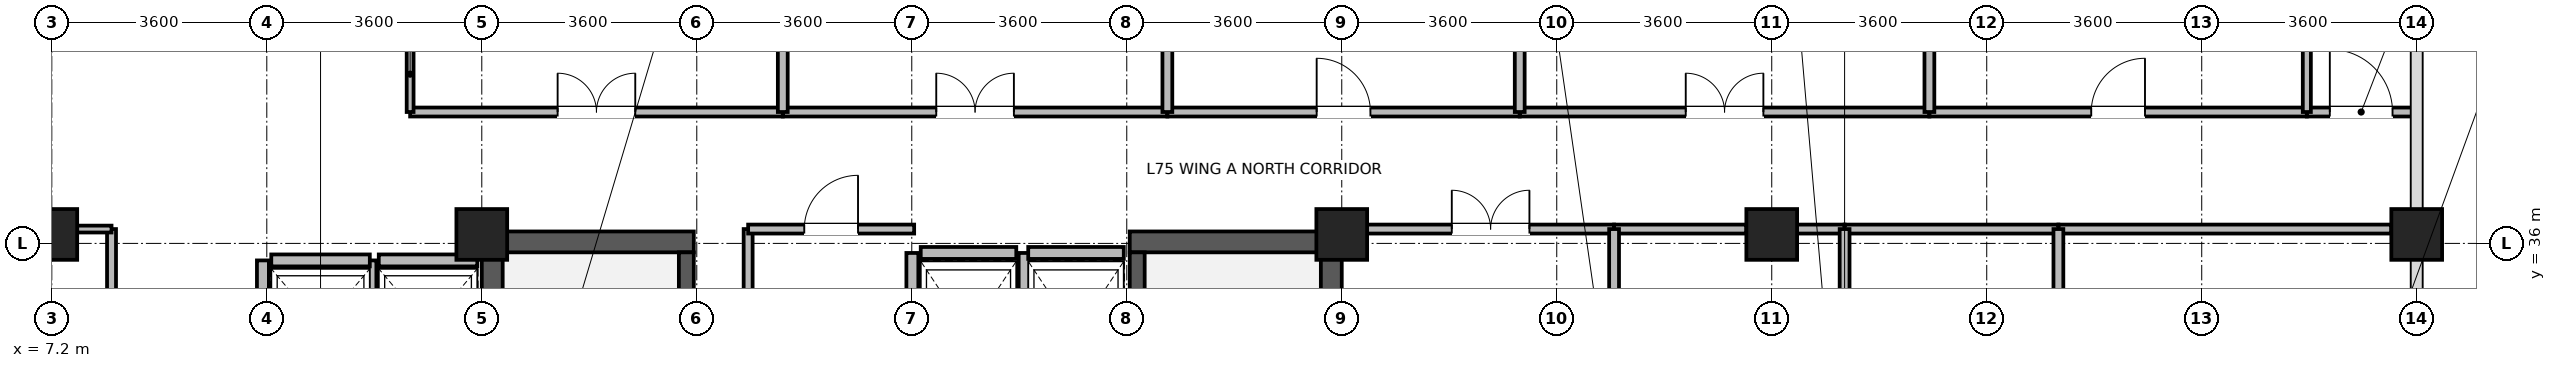
"""IFC4 building model, lengths in metres.
Left out: names, types, materials, properties, quantities, classifications, styles, units other than length and angle.
Written with IfcOpenShell. Run it as: python <this file> out.ifc"""

import sys

from ifc_helpers import new_model, si_unit, direction, frame, frame_2d, origin, origin_2d, place, context, subcontext, project, spatial, rectangle, extrude, source, transform, mapped, element, fill, save


model = new_model("IFC4")
c1 = context("Model", 3, precision=1e-05, world=origin(), true_north=direction((0.0, 1.0)))
c2 = subcontext(c1, "Body", "Model", "MODEL_VIEW")
j1 = project(units=[si_unit("LENGTHUNIT", "METRE"), si_unit("PLANEANGLEUNIT", "RADIAN")], contexts=[c1])
p1 = place(None, origin())
s1 = spatial("IfcSite", under=j1, at=p1, CompositionType="ELEMENT")
p2 = place(p1, origin())
s2 = spatial("IfcBuilding", under=s1, at=p2, CompositionType="ELEMENT")
p3 = place(p2, frame((0.0, 0.0, 290.6)))
s3 = spatial("IfcBuildingStorey", under=s2, at=p3, CompositionType="ELEMENT", Elevation=290.6)
for number, where, z_axis, x_axis in (
    (1, (14.575, 28.5, 0.0), (0.0, 0.0, 1.0), (0.0, 1.0, 0.0)),
    (2, (28.625, 28.5, 0.0), (0.0, 0.0, 1.0), (0.0, 1.0, 0.0)),
):
    element("IfcWall", number, at=place(p3, frame(where, z_axis=z_axis, x_axis=x_axis)), inside=s3, PredefinedType="SHEAR", context=c2, shape_type="SweptSolid", body=[
        extrude(rectangle(XDim=7.7, YDim=0.35, at=frame_2d((3.85, 0.0))), origin(), (0.0, 0.0, 1.0), 3.475),
    ])
for number, where, z_axis, x_axis in (
    (3, (14.75, 36.025, 0.0), (0.0, 0.0, 1.0), (1.0, 0.0, 0.0)),
    (4, (25.25, 36.025, 0.0), (0.0, 0.0, 1.0), (1.0, 0.0, 0.0)),
):
    element("IfcWall", number, at=place(p3, frame(where, z_axis=z_axis, x_axis=x_axis)), inside=s3, PredefinedType="SHEAR", context=c2, shape_type="SweptSolid", body=[
        extrude(rectangle(XDim=3.2, YDim=0.35, at=frame_2d((1.6, 0.0))), origin(), (0.0, 0.0, 1.0), 3.475),
    ])
p4 = place(p3, frame((17.825, 28.85, 0.0), z_axis=(0.0, 0.0, 1.0), x_axis=(0.0, 1.0, 0.0)))
e5 = element("IfcWall", 5, at=p4, inside=s3, PredefinedType="SHEAR", context=c2, shape_type="SweptSolid", body=[
    extrude(rectangle(XDim=7.0, YDim=0.25, at=frame_2d((3.5, 0.0))), origin(), (0.0, 0.0, 1.0), 3.475),
])
p5 = place(p4, frame((0.15, 0.0, 0.0)))
e6 = element("IfcOpeningElement", 6, at=p5, cuts=e5, PredefinedType="OPENING", context=c2, shape_type="SweptSolid", body=[
    extrude(rectangle(XDim=1.1, YDim=2.08, at=frame_2d((0.55, 1.04))), frame((0.0, 0.135, 0.0), z_axis=(0.0, -1.0, 0.0), x_axis=(1.0, 0.0, 0.0)), (0.0, 0.0, 1.0), 0.27),
])
p6 = place(p3, frame((25.375, 28.85, 0.0), z_axis=(0.0, 0.0, 1.0), x_axis=(0.0, 1.0, 0.0)))
e7 = element("IfcWall", 7, at=p6, inside=s3, PredefinedType="SHEAR", context=c2, shape_type="SweptSolid", body=[
    extrude(rectangle(XDim=7.0, YDim=0.25, at=frame_2d((3.5, 0.0))), origin(), (0.0, 0.0, 1.0), 3.475),
])
p7 = place(p6, frame((0.15, 0.0, 0.0)))
e8 = element("IfcOpeningElement", 8, at=p7, cuts=e7, PredefinedType="OPENING", context=c2, shape_type="SweptSolid", body=[
    extrude(rectangle(XDim=1.1, YDim=2.08, at=frame_2d((0.55, 1.04))), frame((0.0, 0.135, 0.0), z_axis=(0.0, -1.0, 0.0), x_axis=(1.0, 0.0, 0.0)), (0.0, 0.0, 1.0), 0.27),
])
m1 = source(origin(), c2, "Body", "SweptSolid", [
    extrude(rectangle(XDim=0.85, YDim=0.85, at=origin_2d()), origin(), (0.0, 0.0, 1.0), 3.7),
])
for number, where, z_axis, x_axis in (
    (9, (7.2, 36.15, 0.0), (0.0, 0.0, 1.0), (1.0, 0.0, 0.0)),
    (10, (14.4, 36.15, 0.0), (0.0, 0.0, 1.0), (1.0, 0.0, 0.0)),
    (11, (28.8, 36.15, 0.0), (0.0, 0.0, 1.0), (1.0, 0.0, 0.0)),
    (12, (36.0, 36.15, 0.0), (0.0, 0.0, 1.0), (1.0, 0.0, 0.0)),
    (13, (46.8, 36.15, 0.0), (0.0, 0.0, 1.0), (1.0, 0.0, 0.0)),
):
    element("IfcColumn", number, at=place(p3, frame(where, z_axis=z_axis, x_axis=x_axis)), inside=s3, PredefinedType="COLUMN", context=c2, shape_type="MappedRepresentation", body=[
        mapped(m1, transform((0.0, 0.0, 0.0), x_axis=(1.0, 0.0, 0.0), y_axis=(0.0, 1.0, 0.0), z_axis=(0.0, 0.0, 1.0), scale=1.0)),
    ])
p8 = place(p3, frame((12.675, 35.715, 0.0), z_axis=(0.0, 0.0, 1.0), x_axis=(1.0, 0.0, 0.0)))
e14 = element("IfcWall", 14, at=p8, inside=s3, PredefinedType="PARTITIONING", context=c2, shape_type="SweptSolid", body=[
    extrude(rectangle(XDim=1.65, YDim=0.2, at=frame_2d((0.825, 0.0))), origin(), (0.0, 0.0, 1.0), 3.455),
])
p9 = place(p3, frame((12.535, 33.485, 0.0), z_axis=(0.0, 0.0, 1.0), x_axis=(0.0, 1.0, 0.0)))
e15 = element("IfcWall", 15, at=p9, inside=s3, PredefinedType="PARTITIONING", context=c2, shape_type="SweptSolid", body=[
    extrude(rectangle(XDim=2.23, YDim=0.2, at=frame_2d((1.115, 0.0))), origin(), (0.0, 0.0, 1.0), 3.455),
])
p10 = place(p3, frame((10.875, 35.715, 0.0), z_axis=(0.0, 0.0, 1.0), x_axis=(1.0, 0.0, 0.0)))
e16 = element("IfcWall", 16, at=p10, inside=s3, PredefinedType="PARTITIONING", context=c2, shape_type="SweptSolid", body=[
    extrude(rectangle(XDim=1.65, YDim=0.2, at=frame_2d((0.825, 0.0))), origin(), (0.0, 0.0, 1.0), 3.455),
])
p11 = place(p3, frame((10.735, 33.485, 0.0), z_axis=(0.0, 0.0, 1.0), x_axis=(0.0, 1.0, 0.0)))
e17 = element("IfcWall", 17, at=p11, inside=s3, PredefinedType="PARTITIONING", context=c2, shape_type="SweptSolid", body=[
    extrude(rectangle(XDim=2.23, YDim=0.2, at=frame_2d((1.115, 0.0))), origin(), (0.0, 0.0, 1.0), 3.455),
])
p12 = place(p3, frame((21.75, 35.84, 0.0), z_axis=(0.0, 0.0, 1.0), x_axis=(1.0, 0.0, 0.0)))
e18 = element("IfcWall", 18, at=p12, inside=s3, PredefinedType="PARTITIONING", context=c2, shape_type="SweptSolid", body=[
    extrude(rectangle(XDim=1.6, YDim=0.2, at=frame_2d((0.8, 0.0))), origin(), (0.0, 0.0, 1.0), 2.555),
])
for number, where, z_axis, x_axis in (
    (19, (21.61, 33.16, 0.0), (0.0, 0.0, 1.0), (0.0, 1.0, 0.0)),
    (20, (23.49, 33.16, 0.0), (0.0, 0.0, 1.0), (0.0, 1.0, 0.0)),
):
    element("IfcWall", number, at=place(p3, frame(where, z_axis=z_axis, x_axis=x_axis)), inside=s3, PredefinedType="PARTITIONING", context=c2, shape_type="SweptSolid", body=[
        extrude(rectangle(XDim=2.68, YDim=0.2, at=frame_2d((1.34, 0.0))), origin(), (0.0, 0.0, 1.0), 3.455),
    ])
p13 = place(p3, frame((23.55, 35.84, 0.0), z_axis=(0.0, 0.0, 1.0), x_axis=(1.0, 0.0, 0.0)))
e21 = element("IfcWall", 21, at=p13, inside=s3, PredefinedType="PARTITIONING", context=c2, shape_type="SweptSolid", body=[
    extrude(rectangle(XDim=1.6, YDim=0.2, at=frame_2d((0.8, 0.0))), origin(), (0.0, 0.0, 1.0), 2.555),
])
p14 = place(p3, frame((31.78, 38.2, 0.0), z_axis=(0.0, 0.0, 1.0), x_axis=(1.0, 0.0, 0.0)))
e22 = element("IfcWall", 22, at=p14, inside=s3, PredefinedType="PARTITIONING", context=c2, shape_type="SweptSolid", body=[
    extrude(rectangle(XDim=6.86, YDim=0.15, at=frame_2d((3.43, 0.0))), origin(), (0.0, 0.0, 1.0), 3.455),
])
p15 = place(p14, frame((2.78, 0.0, 0.0)))
e23 = element("IfcOpeningElement", 23, at=p15, cuts=e22, PredefinedType="OPENING", context=c2, shape_type="SweptSolid", body=[
    extrude(rectangle(XDim=1.3, YDim=2.12, at=frame_2d((0.65, 1.06))), frame((0.0, 0.085, 0.0), z_axis=(0.0, -1.0, 0.0), x_axis=(1.0, 0.0, 0.0)), (0.0, 0.0, 1.0), 0.17),
])
p16 = place(p3, frame((19.44, 38.2, 0.0), z_axis=(0.0, 0.0, 1.0), x_axis=(1.0, 0.0, 0.0)))
e24 = element("IfcWall", 24, at=p16, inside=s3, PredefinedType="PARTITIONING", context=c2, shape_type="SweptSolid", body=[
    extrude(rectangle(XDim=6.44, YDim=0.15, at=frame_2d((3.22, 0.0))), origin(), (0.0, 0.0, 1.0), 3.455),
])
p17 = place(p16, frame((2.57, 0.0, 0.0)))
e25 = element("IfcOpeningElement", 25, at=p17, cuts=e24, PredefinedType="OPENING", context=c2, shape_type="SweptSolid", body=[
    extrude(rectangle(XDim=1.3, YDim=2.12, at=frame_2d((0.65, 1.06))), frame((0.0, 0.085, 0.0), z_axis=(0.0, -1.0, 0.0), x_axis=(1.0, 0.0, 0.0)), (0.0, 0.0, 1.0), 0.17),
])
p18 = place(p3, frame((38.64, 38.2, 0.0), z_axis=(0.0, 0.0, 1.0), x_axis=(1.0, 0.0, 0.0)))
e26 = element("IfcWall", 26, at=p18, inside=s3, PredefinedType="PARTITIONING", context=c2, shape_type="SweptSolid", body=[
    extrude(rectangle(XDim=6.32, YDim=0.15, at=frame_2d((3.16, 0.0))), origin(), (0.0, 0.0, 1.0), 3.455),
])
p19 = place(p18, frame((2.71, 0.0, 0.0)))
e27 = element("IfcOpeningElement", 27, at=p19, cuts=e26, PredefinedType="OPENING", context=c2, shape_type="SweptSolid", body=[
    extrude(rectangle(XDim=0.9, YDim=2.08, at=frame_2d((0.45, 1.04))), frame((0.0, 0.085, 0.0), z_axis=(0.0, -1.0, 0.0), x_axis=(1.0, 0.0, 0.0)), (0.0, 0.0, 1.0), 0.17),
])
p20 = place(p3, frame((13.2, 38.2, 0.0), z_axis=(0.0, 0.0, 1.0), x_axis=(1.0, 0.0, 0.0)))
e28 = element("IfcWall", 28, at=p20, inside=s3, PredefinedType="PARTITIONING", context=c2, shape_type="SweptSolid", body=[
    extrude(rectangle(XDim=6.24, YDim=0.15, at=frame_2d((3.12, 0.0))), origin(), (0.0, 0.0, 1.0), 3.455),
])
p21 = place(p20, frame((2.47, 0.0, 0.0)))
e29 = element("IfcOpeningElement", 29, at=p21, cuts=e28, PredefinedType="OPENING", context=c2, shape_type="SweptSolid", body=[
    extrude(rectangle(XDim=1.3, YDim=2.12, at=frame_2d((0.65, 1.06))), frame((0.0, 0.085, 0.0), z_axis=(0.0, -1.0, 0.0), x_axis=(1.0, 0.0, 0.0)), (0.0, 0.0, 1.0), 0.17),
])
p22 = place(p3, frame((40.8, 36.24, 0.0), z_axis=(0.0, 0.0, 1.0), x_axis=(1.0, 0.0, 0.0)))
e30 = element("IfcWall", 30, at=p22, inside=s3, PredefinedType="PARTITIONING", context=c2, shape_type="SweptSolid", body=[
    extrude(rectangle(XDim=5.575, YDim=0.15, at=frame_2d((2.788, 0.0))), origin(), (0.0, 0.0, 1.0), 2.905),
])
p23 = place(p3, frame((25.88, 38.2, 0.0), z_axis=(0.0, 0.0, 1.0), x_axis=(1.0, 0.0, 0.0)))
e31 = element("IfcWall", 31, at=p23, inside=s3, PredefinedType="PARTITIONING", context=c2, shape_type="SweptSolid", body=[
    extrude(rectangle(XDim=5.9, YDim=0.15, at=frame_2d((2.95, 0.0))), origin(), (0.0, 0.0, 1.0), 3.455),
])
p24 = place(p23, frame((2.5, 0.0, 0.0)))
e32 = element("IfcOpeningElement", 32, at=p24, cuts=e31, PredefinedType="OPENING", context=c2, shape_type="SweptSolid", body=[
    extrude(rectangle(XDim=0.9, YDim=2.08, at=frame_2d((0.45, 1.04))), frame((0.0, 0.085, 0.0), z_axis=(0.0, -1.0, 0.0), x_axis=(1.0, 0.0, 0.0)), (0.0, 0.0, 1.0), 0.17),
])
p25 = place(p3, frame((29.225, 36.24, 0.0), z_axis=(0.0, 0.0, 1.0), x_axis=(1.0, 0.0, 0.0)))
e33 = element("IfcWall", 33, at=p25, inside=s3, PredefinedType="PARTITIONING", context=c2, shape_type="SweptSolid", body=[
    extrude(rectangle(XDim=4.135, YDim=0.15, at=frame_2d((2.067, 0.0))), origin(), (0.0, 0.0, 1.0), 2.905),
])
p26 = place(p25, frame((1.417, 0.0, 0.0)))
e34 = element("IfcOpeningElement", 34, at=p26, cuts=e33, PredefinedType="OPENING", context=c2, shape_type="SweptSolid", body=[
    extrude(rectangle(XDim=1.3, YDim=2.12, at=frame_2d((0.65, 1.06))), frame((0.0, 0.085, 0.0), z_axis=(0.0, -1.0, 0.0), x_axis=(1.0, 0.0, 0.0)), (0.0, 0.0, 1.0), 0.17),
])
p27 = place(p3, frame((33.36, 36.24, 0.0), z_axis=(0.0, 0.0, 1.0), x_axis=(1.0, 0.0, 0.0)))
e35 = element("IfcWall", 35, at=p27, inside=s3, PredefinedType="PARTITIONING", context=c2, shape_type="SweptSolid", body=[
    extrude(rectangle(XDim=2.215, YDim=0.15, at=frame_2d((1.107, 0.0))), origin(), (0.0, 0.0, 1.0), 2.905),
])
p28 = place(p3, frame((36.425, 36.24, 0.0), z_axis=(0.0, 0.0, 1.0), x_axis=(1.0, 0.0, 0.0)))
e36 = element("IfcWall", 36, at=p28, inside=s3, PredefinedType="PARTITIONING", context=c2, shape_type="SweptSolid", body=[
    extrude(rectangle(XDim=0.795, YDim=0.15, at=frame_2d((0.397, 0.0))), origin(), (0.0, 0.0, 1.0), 2.905),
])
p29 = place(p3, frame((8.2, 32.4, 0.0), z_axis=(0.0, 0.0, 1.0), x_axis=(0.0, 1.0, 0.0)))
e37 = element("IfcWall", 37, at=p29, inside=s3, PredefinedType="PARTITIONING", context=c2, shape_type="SweptSolid", body=[
    extrude(rectangle(XDim=3.84, YDim=0.15, at=frame_2d((1.92, 0.0))), origin(), (0.0, 0.0, 1.0), 3.455),
])
p30 = place(p29, frame((1.27, 0.0, 0.0)))
e38 = element("IfcOpeningElement", 38, at=p30, cuts=e37, PredefinedType="OPENING", context=c2, shape_type="SweptSolid", body=[
    extrude(rectangle(XDim=1.3, YDim=2.12, at=frame_2d((0.65, 1.06))), frame((0.0, 0.085, 0.0), z_axis=(0.0, -1.0, 0.0), x_axis=(1.0, 0.0, 0.0)), (0.0, 0.0, 1.0), 0.17),
])
p31 = place(p3, frame((37.22, 36.24, 0.0), z_axis=(0.0, 0.0, 1.0), x_axis=(1.0, 0.0, 0.0)))
e39 = element("IfcWall", 39, at=p31, inside=s3, PredefinedType="PARTITIONING", context=c2, shape_type="SweptSolid", body=[
    extrude(rectangle(XDim=3.58, YDim=0.15, at=frame_2d((1.79, 0.0))), origin(), (0.0, 0.0, 1.0), 2.905),
])
p32 = place(p3, frame((18.86, 33.36, 0.0), z_axis=(0.0, 0.0, 1.0), x_axis=(0.0, 1.0, 0.0)))
e40 = element("IfcWall", 40, at=p32, inside=s3, PredefinedType="PARTITIONING", context=c2, shape_type="SweptSolid", body=[
    extrude(rectangle(XDim=2.88, YDim=0.15, at=frame_2d((1.44, 0.0))), origin(), (0.0, 0.0, 1.0), 3.455),
])
p33 = place(p3, frame((18.86, 36.24, 0.0), z_axis=(0.0, 0.0, 1.0), x_axis=(1.0, 0.0, 0.0)))
e41 = element("IfcWall", 41, at=p33, inside=s3, PredefinedType="PARTITIONING", context=c2, shape_type="SweptSolid", body=[
    extrude(rectangle(XDim=2.78, YDim=0.15, at=frame_2d((1.39, 0.0))), origin(), (0.0, 0.0, 1.0), 2.555),
])
p34 = place(p33, frame((0.94, 0.0, 0.0)))
e42 = element("IfcOpeningElement", 42, at=p34, cuts=e41, PredefinedType="OPENING", context=c2, shape_type="SweptSolid", body=[
    extrude(rectangle(XDim=0.9, YDim=2.08, at=frame_2d((0.45, 1.04))), frame((0.0, 0.085, 0.0), z_axis=(0.0, -1.0, 0.0), x_axis=(1.0, 0.0, 0.0)), (0.0, 0.0, 1.0), 0.17),
])
p35 = place(p3, frame((44.96, 38.2, 0.0), z_axis=(0.0, 0.0, 1.0), x_axis=(1.0, 0.0, 0.0)))
e43 = element("IfcWall", 43, at=p35, inside=s3, PredefinedType="PARTITIONING", context=c2, shape_type="SweptSolid", body=[
    extrude(rectangle(XDim=1.82, YDim=0.15, at=frame_2d((0.91, 0.0))), origin(), (0.0, 0.0, 1.0), 3.455),
])
p36 = place(p35, frame((0.385, 0.0, 0.0)))
e44 = element("IfcOpeningElement", 44, at=p36, cuts=e43, PredefinedType="OPENING", context=c2, shape_type="SweptSolid", body=[
    extrude(rectangle(XDim=1.05, YDim=2.12, at=frame_2d((0.525, 1.06))), frame((0.0, 0.085, 0.0), z_axis=(0.0, -1.0, 0.0), x_axis=(1.0, 0.0, 0.0)), (0.0, 0.0, 1.0), 0.17),
])
for number, where, z_axis, x_axis in (
    (45, (37.22, 28.56, 0.0), (0.0, 0.0, 1.0), (0.0, 1.0, 0.0)),
    (46, (40.8, 28.56, 0.0), (0.0, 0.0, 1.0), (0.0, 1.0, 0.0)),
):
    element("IfcWall", number, at=place(p3, frame(where, z_axis=z_axis, x_axis=x_axis)), inside=s3, PredefinedType="PARTITIONING", context=c2, shape_type="SweptSolid", body=[
        extrude(rectangle(XDim=7.68, YDim=0.165, at=frame_2d((3.84, 0.0))), origin(), (0.0, 0.0, 1.0), 3.455),
    ])
p37 = place(p3, frame((13.2, 38.2, 0.0), z_axis=(0.0, 0.0, 1.0), x_axis=(0.0, 1.0, 0.0)))
e47 = element("IfcWall", 47, at=p37, inside=s3, PredefinedType="PARTITIONING", context=c2, shape_type="SweptSolid", body=[
    extrude(rectangle(XDim=1.268, YDim=0.115, at=frame_2d((0.634, 0.0))), origin(), (0.0, 0.0, 1.0), 3.455),
])
for number, where, z_axis, x_axis in (
    (48, (19.44, 38.2, 0.0), (0.0, 0.0, 1.0), (0.0, 1.0, 0.0)),
    (49, (25.88, 38.2, 0.0), (0.0, 0.0, 1.0), (0.0, 1.0, 0.0)),
    (50, (31.78, 38.2, 0.0), (0.0, 0.0, 1.0), (0.0, 1.0, 0.0)),
    (51, (38.64, 38.2, 0.0), (0.0, 0.0, 1.0), (0.0, 1.0, 0.0)),
):
    element("IfcWall", number, at=place(p3, frame(where, z_axis=z_axis, x_axis=x_axis)), inside=s3, PredefinedType="PARTITIONING", context=c2, shape_type="SweptSolid", body=[
        extrude(rectangle(XDim=4.868, YDim=0.165, at=frame_2d((2.434, 0.0))), origin(), (0.0, 0.0, 1.0), 3.455),
    ])
p38 = place(p3, frame((44.96, 38.2, 0.0), z_axis=(0.0, 0.0, 1.0), x_axis=(0.0, 1.0, 0.0)))
e52 = element("IfcWall", 52, at=p38, inside=s3, PredefinedType="PARTITIONING", context=c2, shape_type="SweptSolid", body=[
    extrude(rectangle(XDim=4.868, YDim=0.135, at=frame_2d((2.434, 0.0))), origin(), (0.0, 0.0, 1.0), 3.455),
])
p39 = place(p3, frame((33.36, 31.64, 0.0), z_axis=(0.0, 0.0, 1.0), x_axis=(0.0, 1.0, 0.0)))
e53 = element("IfcWall", 53, at=p39, inside=s3, PredefinedType="PARTITIONING", context=c2, shape_type="SweptSolid", body=[
    extrude(rectangle(XDim=4.6, YDim=0.165, at=frame_2d((2.3, 0.0))), origin(), (0.0, 0.0, 1.0), 3.455),
])
p40 = place(p3, frame((7.625, 36.24, 0.0), z_axis=(0.0, 0.0, 1.0), x_axis=(1.0, 0.0, 0.0)))
e54 = element("IfcWall", 54, at=p40, inside=s3, PredefinedType="PARTITIONING", context=c2, shape_type="SweptSolid", body=[
    extrude(rectangle(XDim=0.575, YDim=0.115, at=frame_2d((0.288, 0.0))), origin(), (0.0, 0.0, 1.0), 2.905),
])
p41 = place(p15, origin())
e55 = element("IfcDoor", 55, at=p41, inside=s3, OperationType="DOUBLE_DOOR_SINGLE_SWING", PredefinedType="DOOR", context=c2, shape_type="SweptSolid", body=[
    extrude(rectangle(XDim=1.3, YDim=2.12, at=frame_2d((0.65, 1.06))), frame((0.0, 0.025, 0.0), z_axis=(0.0, -1.0, 0.0), x_axis=(1.0, 0.0, 0.0)), (0.0, 0.0, 1.0), 0.05),
])
fill(e23, e55)
p42 = place(p17, origin())
e56 = element("IfcDoor", 56, at=p42, inside=s3, OperationType="DOUBLE_DOOR_SINGLE_SWING", PredefinedType="DOOR", context=c2, shape_type="SweptSolid", body=[
    extrude(rectangle(XDim=1.3, YDim=2.12, at=frame_2d((0.65, 1.06))), frame((0.0, 0.025, 0.0), z_axis=(0.0, -1.0, 0.0), x_axis=(1.0, 0.0, 0.0)), (0.0, 0.0, 1.0), 0.05),
])
fill(e25, e56)
p43 = place(p19, origin())
e57 = element("IfcDoor", 57, at=p43, inside=s3, OperationType="SINGLE_SWING_RIGHT", PredefinedType="DOOR", context=c2, shape_type="SweptSolid", body=[
    extrude(rectangle(XDim=0.9, YDim=2.08, at=frame_2d((0.45, 1.04))), frame((0.0, 0.025, 0.0), z_axis=(0.0, -1.0, 0.0), x_axis=(1.0, 0.0, 0.0)), (0.0, 0.0, 1.0), 0.05),
])
fill(e27, e57)
p44 = place(p21, origin())
e58 = element("IfcDoor", 58, at=p44, inside=s3, OperationType="DOUBLE_DOOR_SINGLE_SWING", PredefinedType="DOOR", context=c2, shape_type="SweptSolid", body=[
    extrude(rectangle(XDim=1.3, YDim=2.12, at=frame_2d((0.65, 1.06))), frame((0.0, 0.025, 0.0), z_axis=(0.0, -1.0, 0.0), x_axis=(1.0, 0.0, 0.0)), (0.0, 0.0, 1.0), 0.05),
])
fill(e29, e58)
p45 = place(p24, origin())
e59 = element("IfcDoor", 59, at=p45, inside=s3, OperationType="SINGLE_SWING_LEFT", PredefinedType="DOOR", context=c2, shape_type="SweptSolid", body=[
    extrude(rectangle(XDim=0.9, YDim=2.08, at=frame_2d((0.45, 1.04))), frame((0.0, 0.025, 0.0), z_axis=(0.0, -1.0, 0.0), x_axis=(1.0, 0.0, 0.0)), (0.0, 0.0, 1.0), 0.05),
])
fill(e32, e59)
p46 = place(p26, origin())
e60 = element("IfcDoor", 60, at=p46, inside=s3, OperationType="DOUBLE_DOOR_SINGLE_SWING", PredefinedType="DOOR", context=c2, shape_type="SweptSolid", body=[
    extrude(rectangle(XDim=1.3, YDim=2.12, at=frame_2d((0.65, 1.06))), frame((0.0, 0.025, 0.0), z_axis=(0.0, -1.0, 0.0), x_axis=(1.0, 0.0, 0.0)), (0.0, 0.0, 1.0), 0.05),
])
fill(e34, e60)
p47 = place(p34, origin())
e61 = element("IfcDoor", 61, at=p47, inside=s3, OperationType="SINGLE_SWING_RIGHT", PredefinedType="DOOR", context=c2, shape_type="SweptSolid", body=[
    extrude(rectangle(XDim=0.9, YDim=2.08, at=frame_2d((0.45, 1.04))), frame((0.0, 0.025, 0.0), z_axis=(0.0, -1.0, 0.0), x_axis=(1.0, 0.0, 0.0)), (0.0, 0.0, 1.0), 0.05),
])
fill(e42, e61)
p48 = place(p36, origin())
e62 = element("IfcDoor", 62, at=p48, inside=s3, OperationType="SINGLE_SWING_LEFT", PredefinedType="DOOR", context=c2, shape_type="SweptSolid", body=[
    extrude(rectangle(XDim=1.05, YDim=2.12, at=frame_2d((0.525, 1.06))), frame((0.0, 0.025, 0.0), z_axis=(0.0, -1.0, 0.0), x_axis=(1.0, 0.0, 0.0)), (0.0, 0.0, 1.0), 0.05),
])
fill(e44, e62)
save(model, sys.argv[1])
